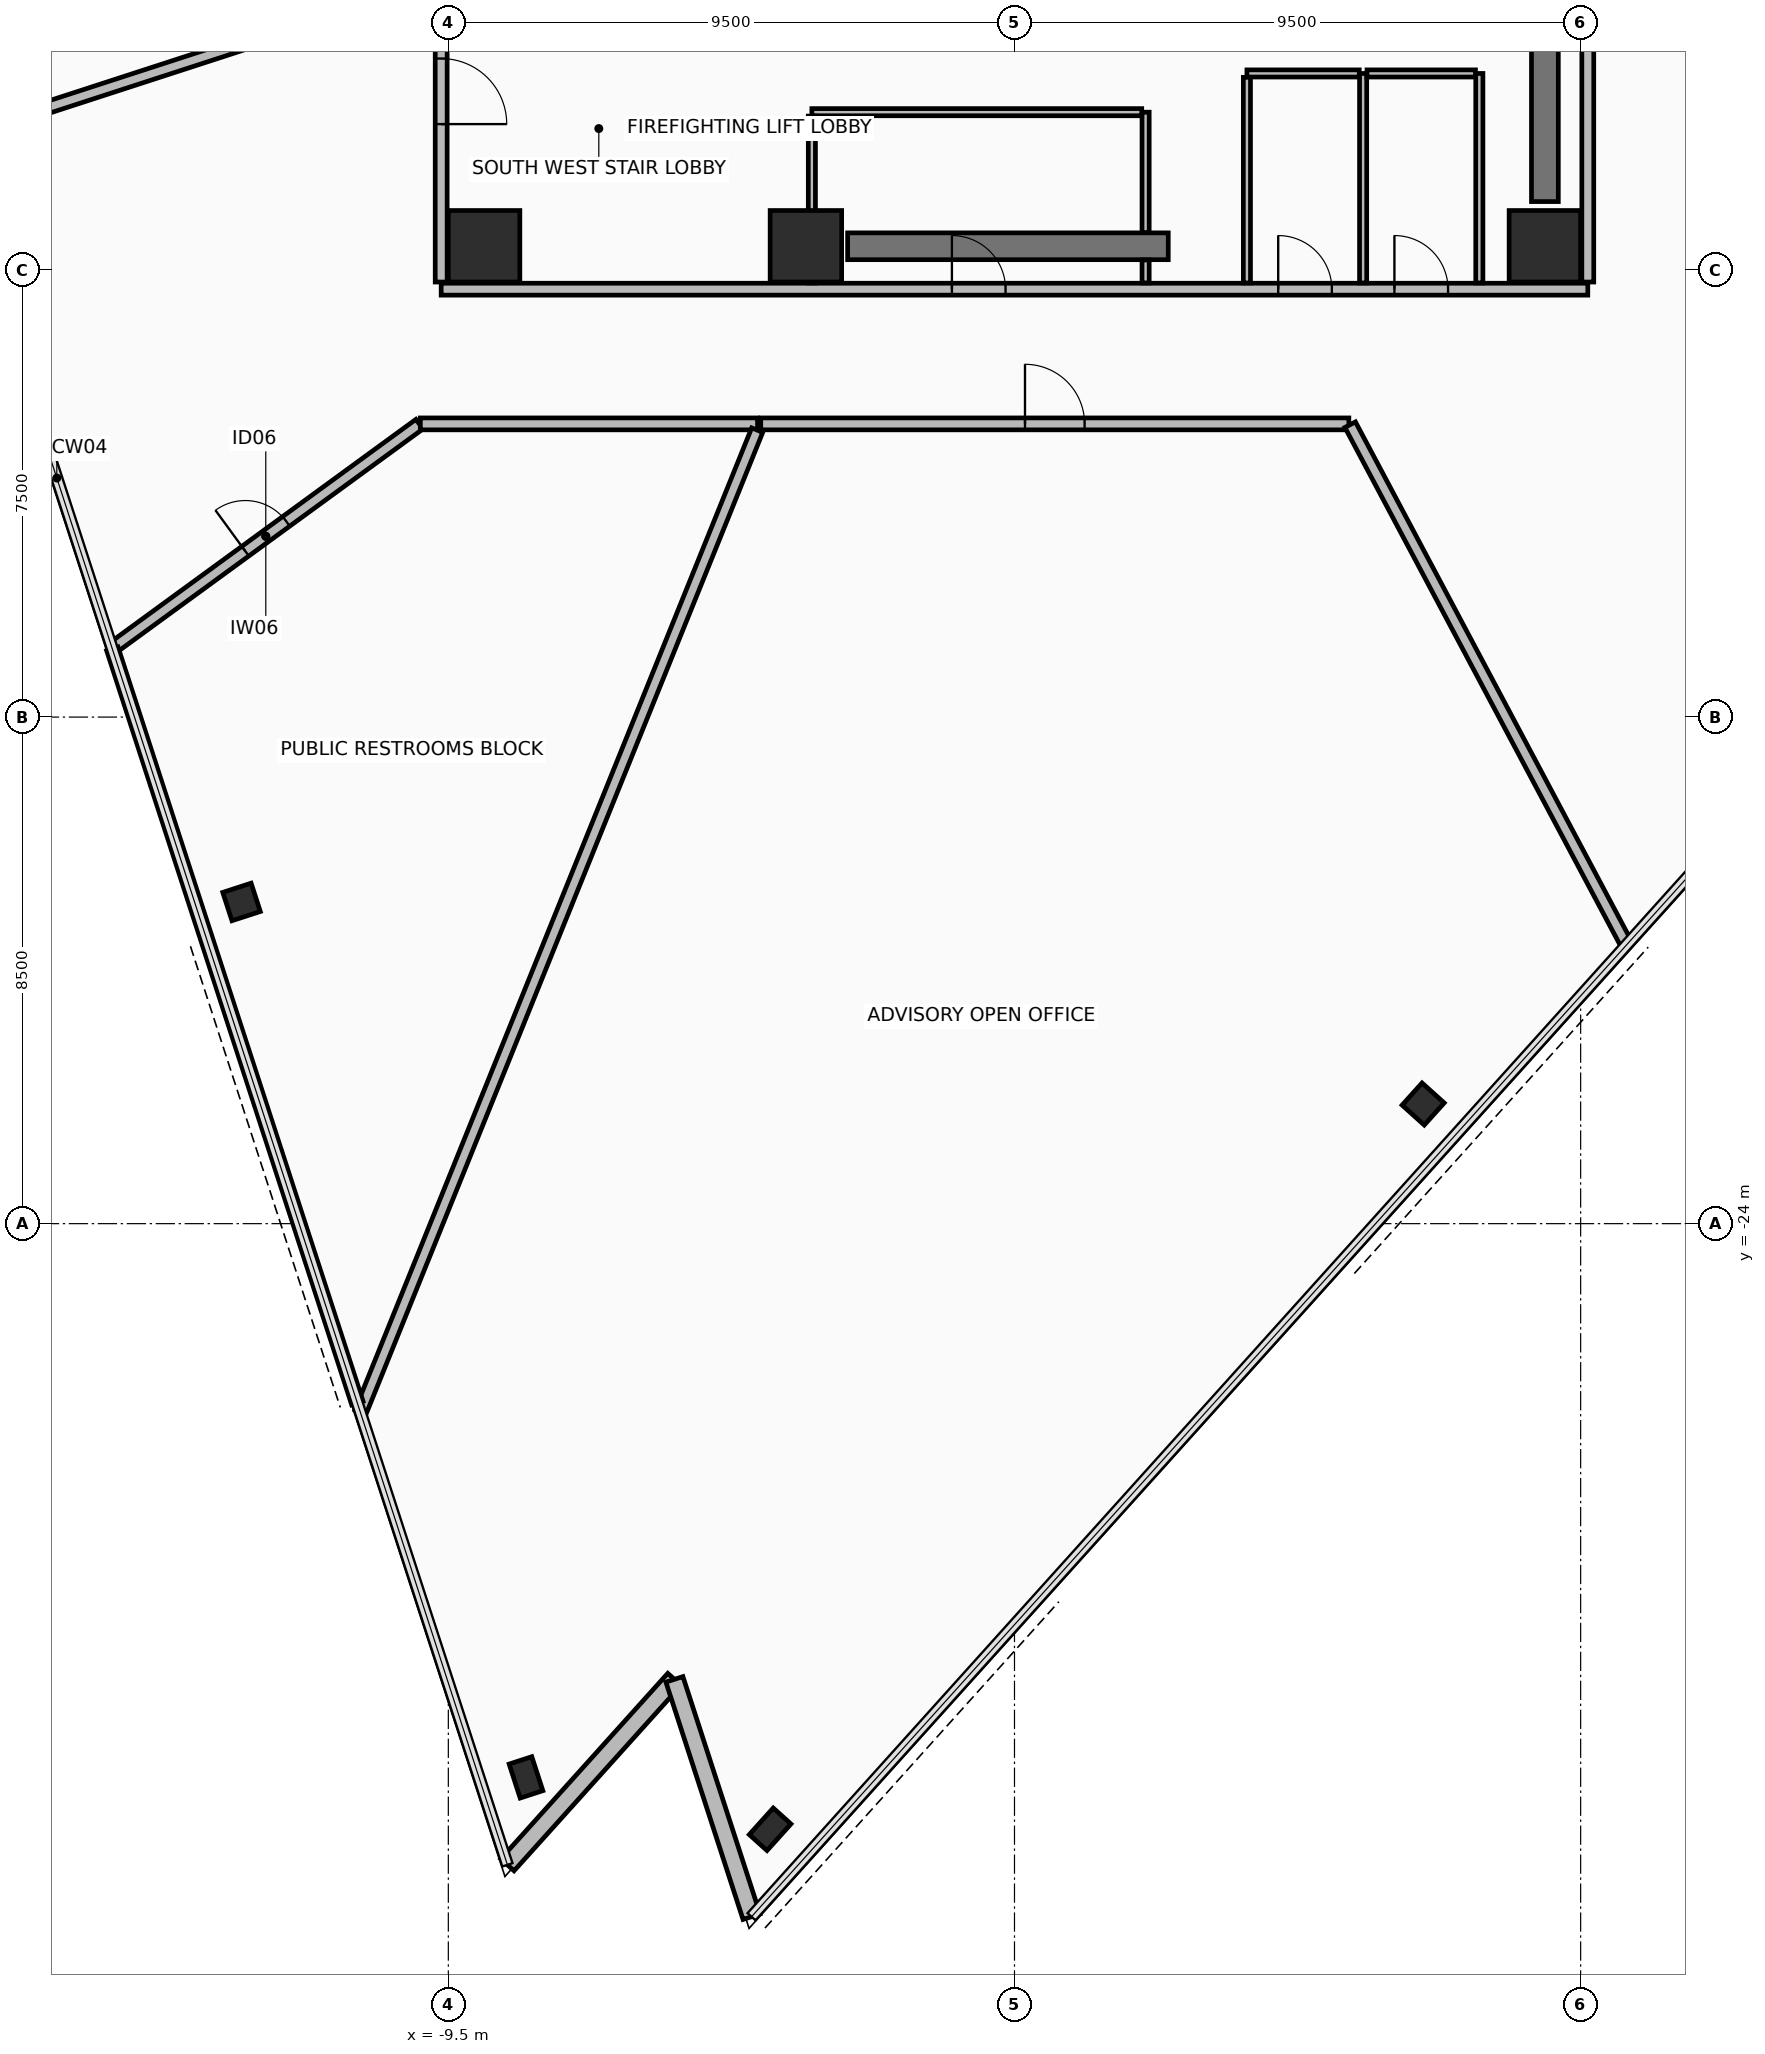
"""IFC4 building model, lengths in metres.
Left out: names, types, materials, properties, quantities, classifications, styles, units other than length and angle.
Written with IfcOpenShell. Run it as: python <this file> out.ifc"""

import sys

from ifc_helpers import new_model, si_unit, direction, frame, frame_2d, origin, origin_2d, place, context, subcontext, project, spatial, rectangle, hollow_rectangle, extrude, element, fill, save


model = new_model("IFC4")
c1 = context("Model", 3, precision=1e-05, world=origin(), true_north=direction((0.0, 1.0)))
c2 = subcontext(c1, "Body", "Model", "MODEL_VIEW")
j1 = project(units=[si_unit("LENGTHUNIT", "METRE"), si_unit("PLANEANGLEUNIT", "RADIAN")], contexts=[c1])
p1 = place(None, origin())
s1 = spatial("IfcSite", under=j1, at=p1, CompositionType="ELEMENT")
p2 = place(p1, origin())
s2 = spatial("IfcBuilding", under=s1, at=p2, CompositionType="ELEMENT")
p3 = place(p2, frame((0.0, 0.0, 207.65)))
s3 = spatial("IfcBuildingStorey", under=s2, at=p3, CompositionType="ELEMENT", Elevation=207.65)
for number, where, z_axis, x_axis in (
    (1, (-8.9, -7.6, 0.0), (0.0, 0.0, 1.0), (1.0, 0.0, 0.0)),
    (2, (-3.5, -7.6, 0.0), (0.0, 0.0, 1.0), (1.0, 0.0, 0.0)),
    (3, (8.9, -7.6, 0.0), (0.0, 0.0, 1.0), (1.0, 0.0, 0.0)),
):
    element("IfcColumn", number, at=place(p3, frame(where, z_axis=z_axis, x_axis=x_axis)), inside=s3, PredefinedType="COLUMN", context=c2, shape_type="SweptSolid", body=[
        extrude(rectangle(XDim=1.2, YDim=1.2, at=origin_2d()), origin(), (0.0, 0.0, 1.0), 3.6),
    ])
p4 = place(p3, frame((-12.97, -18.602, 0.0), z_axis=(0.0, 0.0, 1.0), x_axis=(-0.309016994375, 0.951056516295, 0.0)))
e4 = element("IfcColumn", 4, at=p4, inside=s3, PredefinedType="COLUMN", context=c2, shape_type="SweptSolid", body=[
    extrude(hollow_rectangle(XDim=0.5, YDim=0.5, WallThickness=0.032, at=origin_2d()), origin(), (0.0, 0.0, 1.0), 3.6),
])
for number, where, z_axis, x_axis in (
    (5, (-8.197, -33.292, 0.0), (0.0, 0.0, 1.0), (-0.309, 0.951, 0.0)),
    (6, (-4.1, -34.162, 0.0), (0.0, 0.0, 1.0), (0.669, 0.743, 0.0)),
):
    element("IfcColumn", number, at=place(p3, frame(where, z_axis=z_axis, x_axis=x_axis)), inside=s3, PredefinedType="COLUMN", context=c2, shape_type="SweptSolid", body=[
        extrude(hollow_rectangle(XDim=0.4, YDim=0.6, WallThickness=0.03, at=origin_2d()), origin(), (0.0, 0.0, 1.0), 3.6),
    ])
p5 = place(p3, frame((6.857, -21.992, 0.0), z_axis=(0.0, 0.0, 1.0), x_axis=(0.669130606359, 0.743144825477, 0.0)))
e7 = element("IfcColumn", 7, at=p5, inside=s3, PredefinedType="COLUMN", context=c2, shape_type="SweptSolid", body=[
    extrude(hollow_rectangle(XDim=0.5, YDim=0.5, WallThickness=0.032, at=origin_2d()), origin(), (0.0, 0.0, 1.0), 3.6),
])
p6 = place(p3, frame((-8.509, -34.759, 0.0), z_axis=(0.0, 0.0, 1.0), x_axis=(0.669151507466, 0.743126005504, 0.0)))
e8 = element("IfcWall", 8, at=p6, inside=s3, PredefinedType="STANDARD", context=c2, shape_type="SweptSolid", body=[
    extrude(rectangle(XDim=4.188, YDim=0.3, at=frame_2d((2.094, 0.0))), origin(), (0.0, 0.0, 1.0), 2.715),
])
p7 = place(p3, frame((-5.706, -31.646, 0.0), z_axis=(0.0, 0.0, 1.0), x_axis=(0.309030708092, -0.951052060329, 0.0)))
e9 = element("IfcWall", 9, at=p7, inside=s3, PredefinedType="STANDARD", context=c2, shape_type="SweptSolid", body=[
    extrude(rectangle(XDim=4.188, YDim=0.3, at=frame_2d((2.094, 0.0))), origin(), (0.0, 0.0, 1.0), 2.715),
])
p8 = place(p3, frame((-2.8, -7.6, 0.0), z_axis=(0.0, 0.0, 1.0), x_axis=(1.0, 0.0, 0.0)))
e10 = element("IfcWall", 10, at=p8, inside=s3, PredefinedType="SHEAR", context=c2, shape_type="SweptSolid", body=[
    extrude(rectangle(XDim=5.38, YDim=0.45, at=frame_2d((2.69, 0.0))), origin(), (0.0, 0.0, 1.0), 3.42),
])
p9 = place(p3, frame((8.9, -6.85, 0.0), z_axis=(0.0, 0.0, 1.0), x_axis=(0.0, 1.0, 0.0)))
e11 = element("IfcWall", 11, at=p9, inside=s3, PredefinedType="SHEAR", context=c2, shape_type="SweptSolid", body=[
    extrude(rectangle(XDim=10.7, YDim=0.45, at=frame_2d((5.35, 0.0))), origin(), (0.0, 0.0, 1.0), 3.42),
])
p10 = place(p3, frame((-9.62, -8.32, 0.0), z_axis=(0.0, 0.0, 1.0), x_axis=(1.0, 0.0, 0.0)))
e12 = element("IfcWall", 12, at=p10, inside=s3, PredefinedType="PARTITIONING", context=c2, shape_type="SweptSolid", body=[
    extrude(rectangle(XDim=19.24, YDim=0.2, at=frame_2d((9.62, 0.0))), origin(), (0.0, 0.0, 1.0), 2.865),
])
p11 = place(p10, frame((8.57, 0.0, 0.0)))
e13 = element("IfcOpeningElement", 13, at=p11, cuts=e12, PredefinedType="OPENING", context=c2, shape_type="SweptSolid", body=[
    extrude(rectangle(XDim=0.9, YDim=2.1, at=frame_2d((0.45, 1.05))), frame((0.0, 0.11, 0.0), z_axis=(0.0, -1.0, 0.0), x_axis=(1.0, 0.0, 0.0)), (0.0, 0.0, 1.0), 0.22),
])
p12 = place(p10, frame((14.045, 0.0, 0.0)))
e14 = element("IfcOpeningElement", 14, at=p12, cuts=e12, PredefinedType="OPENING", context=c2, shape_type="SweptSolid", body=[
    extrude(rectangle(XDim=0.9, YDim=2.1, at=frame_2d((0.45, 1.05))), frame((0.0, 0.11, 0.0), z_axis=(0.0, -1.0, 0.0), x_axis=(1.0, 0.0, 0.0)), (0.0, 0.0, 1.0), 0.22),
])
p13 = place(p10, frame((15.995, 0.0, 0.0)))
e15 = element("IfcOpeningElement", 15, at=p13, cuts=e12, PredefinedType="OPENING", context=c2, shape_type="SweptSolid", body=[
    extrude(rectangle(XDim=0.9, YDim=2.1, at=frame_2d((0.45, 1.05))), frame((0.0, 0.11, 0.0), z_axis=(0.0, -1.0, 0.0), x_axis=(1.0, 0.0, 0.0)), (0.0, 0.0, 1.0), 0.22),
])
p14 = place(p3, frame((-9.62, 8.2, 0.0), z_axis=(0.0, 0.0, 1.0), x_axis=(0.0, -1.0, 0.0)))
e16 = element("IfcWall", 16, at=p14, inside=s3, PredefinedType="PARTITIONING", context=c2, shape_type="SweptSolid", body=[
    extrude(rectangle(XDim=16.4, YDim=0.2, at=frame_2d((8.2, 0.0))), origin(), (0.0, 0.0, 1.0), 2.765),
])
p15 = place(p14, frame((12.65, 0.0, 0.0)))
e17 = element("IfcOpeningElement", 17, at=p15, cuts=e16, PredefinedType="OPENING", context=c2, shape_type="SweptSolid", body=[
    extrude(rectangle(XDim=1.1, YDim=2.15, at=frame_2d((0.55, 1.075))), frame((0.0, 0.11, 0.0), z_axis=(0.0, -1.0, 0.0), x_axis=(1.0, 0.0, 0.0)), (0.0, 0.0, 1.0), 0.22),
])
p16 = place(p3, frame((9.62, -8.2, 0.0), z_axis=(0.0, 0.0, 1.0), x_axis=(0.0, 1.0, 0.0)))
e18 = element("IfcWall", 18, at=p16, inside=s3, PredefinedType="PARTITIONING", context=c2, shape_type="SweptSolid", body=[
    extrude(rectangle(XDim=16.4, YDim=0.2, at=frame_2d((8.2, 0.0))), origin(), (0.0, 0.0, 1.0), 2.865),
])
p17 = place(p16, frame((12.65, 0.0, 0.0)))
e19 = element("IfcOpeningElement", 19, at=p17, cuts=e18, PredefinedType="OPENING", context=c2, shape_type="SweptSolid", body=[
    extrude(rectangle(XDim=1.1, YDim=2.15, at=frame_2d((0.55, 1.075))), frame((0.0, 0.11, 0.0), z_axis=(0.0, -1.0, 0.0), x_axis=(1.0, 0.0, 0.0)), (0.0, 0.0, 1.0), 0.22),
])
p18 = place(p3, frame((2.2, -8.215, 0.0), z_axis=(0.0, 0.0, 1.0), x_axis=(0.0, 1.0, 0.0)))
e20 = element("IfcWall", 20, at=p18, inside=s3, PredefinedType="PARTITIONING", context=c2, shape_type="SweptSolid", body=[
    extrude(rectangle(XDim=0.385, YDim=0.12, at=frame_2d((0.192, 0.0))), origin(), (0.0, 0.0, 1.0), 2.715),
])
p19 = place(p3, frame((2.2, -7.37, 0.0), z_axis=(0.0, 0.0, 1.0), x_axis=(0.0, 1.0, 0.0)))
e21 = element("IfcWall", 21, at=p19, inside=s3, PredefinedType="PARTITIONING", context=c2, shape_type="SweptSolid", body=[
    extrude(rectangle(XDim=2.02, YDim=0.12, at=frame_2d((1.01, 0.0))), origin(), (0.0, 0.0, 1.0), 2.715),
])
p20 = place(p3, frame((2.135, -5.35, 0.0), z_axis=(0.0, 0.0, 1.0), x_axis=(-1.0, 0.0, 0.0)))
e22 = element("IfcWall", 22, at=p20, inside=s3, PredefinedType="PARTITIONING", context=c2, shape_type="SweptSolid", body=[
    extrude(rectangle(XDim=5.535, YDim=0.12, at=frame_2d((2.768, 0.0))), origin(), (0.0, 0.0, 1.0), 2.715),
])
p21 = place(p3, frame((-3.4, -5.415, 0.0), z_axis=(0.0, 0.0, 1.0), x_axis=(0.0, -1.0, 0.0)))
e23 = element("IfcWall", 23, at=p21, inside=s3, PredefinedType="PARTITIONING", context=c2, shape_type="SweptSolid", body=[
    extrude(rectangle(XDim=2.8, YDim=0.12, at=frame_2d((1.4, 0.0))), origin(), (0.0, 0.0, 1.0), 2.715),
])
p22 = place(p3, frame((5.85, -8.215, 0.0), z_axis=(0.0, 0.0, 1.0), x_axis=(0.0, 1.0, 0.0)))
e24 = element("IfcWall", 24, at=p22, inside=s3, PredefinedType="PARTITIONING", context=c2, shape_type="SweptSolid", body=[
    extrude(rectangle(XDim=3.515, YDim=0.12, at=frame_2d((1.758, 0.0))), origin(), (0.0, 0.0, 1.0), 2.715),
])
p23 = place(p3, frame((5.785, -4.7, 0.0), z_axis=(0.0, 0.0, 1.0), x_axis=(-1.0, 0.0, 0.0)))
e25 = element("IfcWall", 25, at=p23, inside=s3, PredefinedType="PARTITIONING", context=c2, shape_type="SweptSolid", body=[
    extrude(rectangle(XDim=1.885, YDim=0.12, at=frame_2d((0.942, 0.0))), origin(), (0.0, 0.0, 1.0), 3.42),
])
p24 = place(p3, frame((3.9, -4.765, 0.0), z_axis=(0.0, 0.0, 1.0), x_axis=(0.0, -1.0, 0.0)))
e26 = element("IfcWall", 26, at=p24, inside=s3, PredefinedType="PARTITIONING", context=c2, shape_type="SweptSolid", body=[
    extrude(rectangle(XDim=3.45, YDim=0.12, at=frame_2d((1.725, 0.0))), origin(), (0.0, 0.0, 1.0), 2.715),
])
p25 = place(p3, frame((7.8, -8.215, 0.0), z_axis=(0.0, 0.0, 1.0), x_axis=(0.0, 1.0, 0.0)))
e27 = element("IfcWall", 27, at=p25, inside=s3, PredefinedType="PARTITIONING", context=c2, shape_type="SweptSolid", body=[
    extrude(rectangle(XDim=3.515, YDim=0.12, at=frame_2d((1.758, 0.0))), origin(), (0.0, 0.0, 1.0), 2.715),
])
p26 = place(p3, frame((7.735, -4.7, 0.0), z_axis=(0.0, 0.0, 1.0), x_axis=(-1.0, 0.0, 0.0)))
e28 = element("IfcWall", 28, at=p26, inside=s3, PredefinedType="PARTITIONING", context=c2, shape_type="SweptSolid", body=[
    extrude(rectangle(XDim=1.82, YDim=0.12, at=frame_2d((0.91, 0.0))), origin(), (0.0, 0.0, 1.0), 3.42),
])
p27 = place(p3, frame((-15.141, -14.347, 0.0), z_axis=(0.0, 0.0, 1.0), x_axis=(0.807843616105, 0.589396888284, 0.0)))
e29 = element("IfcWall", 29, at=p27, inside=s3, PredefinedType="PARTITIONING", context=c2, shape_type="SweptSolid", body=[
    extrude(rectangle(XDim=6.383, YDim=0.2, at=frame_2d((3.191, 0.0))), origin(), (0.0, 0.0, 1.0), 2.715),
])
p28 = place(p27, frame((2.766, 0.0, 0.0)))
e30 = element("IfcOpeningElement", 30, at=p28, cuts=e29, PredefinedType="OPENING", context=c2, shape_type="SweptSolid", body=[
    extrude(rectangle(XDim=0.85, YDim=2.1, at=frame_2d((0.425, 1.05))), frame((0.0, 0.11, 0.0), z_axis=(0.0, -1.0, 0.0), x_axis=(1.0, 0.0, 0.0)), (0.0, 0.0, 1.0), 0.22),
])
p29 = place(p3, frame((-9.97, -10.58, 0.0), z_axis=(0.0, 0.0, 1.0), x_axis=(1.0, 0.0, 0.0)))
e31 = element("IfcWall", 31, at=p29, inside=s3, PredefinedType="PARTITIONING", context=c2, shape_type="SweptSolid", body=[
    extrude(rectangle(XDim=5.658, YDim=0.2, at=frame_2d((2.829, 0.0))), origin(), (0.0, 0.0, 1.0), 2.865),
])
p30 = place(p3, frame((-4.317, -10.685, 0.0), z_axis=(0.0, 0.0, 1.0), x_axis=(-0.374604298034, -0.927184781958, 0.0)))
e32 = element("IfcWall", 32, at=p30, inside=s3, PredefinedType="PARTITIONING", context=c2, shape_type="SweptSolid", body=[
    extrude(rectangle(XDim=17.775, YDim=0.2, at=frame_2d((8.888, 0.0))), origin(), (0.0, 0.0, 1.0), 2.715),
])
p31 = place(p3, frame((-11.026, -27.011, 0.0), z_axis=(0.0, 0.0, 1.0), x_axis=(-0.309025926892, 0.951053613898, 0.0)))
e33 = element("IfcWall", 33, at=p31, inside=s3, PredefinedType="PARTITIONING", context=c2, shape_type="SweptSolid", body=[
    extrude(rectangle(XDim=13.309, YDim=0.2, at=frame_2d((6.654, 0.0))), origin(), (0.0, 0.0, 1.0), 3.42),
])
p32 = place(p3, frame((-11.897, -3.866, 0.0), z_axis=(0.0, 0.0, 1.0), x_axis=(-0.951062833603, -0.308997551024, 0.0)))
e34 = element("IfcWall", 34, at=p32, inside=s3, PredefinedType="PARTITIONING", context=c2, shape_type="SweptSolid", body=[
    extrude(rectangle(XDim=6.299, YDim=0.2, at=frame_2d((3.149, 0.0))), origin(), (0.0, 0.0, 1.0), 2.715),
])
p33 = place(p3, frame((-4.258, -10.58, 0.0), z_axis=(0.0, 0.0, 1.0), x_axis=(1.0, 0.0, 0.0)))
e35 = element("IfcWall", 35, at=p33, inside=s3, PredefinedType="PARTITIONING", context=c2, shape_type="SweptSolid", body=[
    extrude(rectangle(XDim=9.868, YDim=0.2, at=frame_2d((4.934, 0.0))), origin(), (0.0, 0.0, 1.0), 2.865),
])
p34 = place(p33, frame((4.434, 0.0, 0.0)))
e36 = element("IfcOpeningElement", 36, at=p34, cuts=e35, PredefinedType="OPENING", context=c2, shape_type="SweptSolid", body=[
    extrude(rectangle(XDim=1.0, YDim=2.15, at=frame_2d((0.5, 1.075))), frame((0.0, 0.11, 0.0), z_axis=(0.0, -1.0, 0.0), x_axis=(1.0, 0.0, 0.0)), (0.0, 0.0, 1.0), 0.22),
])
p35 = place(p3, frame((5.633, -10.593, 0.0), z_axis=(0.0, 0.0, 1.0), x_axis=(0.46946276715, -0.882952269525, 0.0)))
e37 = element("IfcWall", 37, at=p35, inside=s3, PredefinedType="PARTITIONING", context=c2, shape_type="SweptSolid", body=[
    extrude(rectangle(XDim=9.866, YDim=0.2, at=frame_2d((4.933, 0.0))), origin(), (0.0, 0.0, 1.0), 2.715),
])
p36 = place(p15, frame((1.1, 0.0, 0.0), z_axis=(0.0, 0.0, 1.0), x_axis=(-1.0, 0.0, 0.0)))
e38 = element("IfcDoor", 38, at=p36, inside=s3, OperationType="SINGLE_SWING_LEFT", PredefinedType="DOOR", context=c2, shape_type="SweptSolid", body=[
    extrude(rectangle(XDim=1.1, YDim=2.15, at=frame_2d((0.55, 1.075))), frame((0.0, 0.025, 0.0), z_axis=(0.0, -1.0, 0.0), x_axis=(1.0, 0.0, 0.0)), (0.0, 0.0, 1.0), 0.05),
])
fill(e17, e38)
p37 = place(p11, origin())
e39 = element("IfcDoor", 39, at=p37, inside=s3, OperationType="SINGLE_SWING_LEFT", PredefinedType="DOOR", context=c2, shape_type="SweptSolid", body=[
    extrude(rectangle(XDim=0.9, YDim=2.1, at=frame_2d((0.45, 1.05))), frame((0.0, 0.025, 0.0), z_axis=(0.0, -1.0, 0.0), x_axis=(1.0, 0.0, 0.0)), (0.0, 0.0, 1.0), 0.05),
])
fill(e13, e39)
p38 = place(p12, origin())
e40 = element("IfcDoor", 40, at=p38, inside=s3, OperationType="SINGLE_SWING_LEFT", PredefinedType="DOOR", context=c2, shape_type="SweptSolid", body=[
    extrude(rectangle(XDim=0.9, YDim=2.1, at=frame_2d((0.45, 1.05))), frame((0.0, 0.025, 0.0), z_axis=(0.0, -1.0, 0.0), x_axis=(1.0, 0.0, 0.0)), (0.0, 0.0, 1.0), 0.05),
])
fill(e14, e40)
p39 = place(p13, origin())
e41 = element("IfcDoor", 41, at=p39, inside=s3, OperationType="SINGLE_SWING_LEFT", PredefinedType="DOOR", context=c2, shape_type="SweptSolid", body=[
    extrude(rectangle(XDim=0.9, YDim=2.1, at=frame_2d((0.45, 1.05))), frame((0.0, 0.025, 0.0), z_axis=(0.0, -1.0, 0.0), x_axis=(1.0, 0.0, 0.0)), (0.0, 0.0, 1.0), 0.05),
])
fill(e15, e41)
p40 = place(p28, origin())
e42 = element("IfcDoor", 42, at=p40, inside=s3, OperationType="SINGLE_SWING_RIGHT", PredefinedType="DOOR", context=c2, shape_type="SweptSolid", body=[
    extrude(rectangle(XDim=0.85, YDim=2.1, at=frame_2d((0.425, 1.05))), frame((0.0, 0.025, 0.0), z_axis=(0.0, -1.0, 0.0), x_axis=(1.0, 0.0, 0.0)), (0.0, 0.0, 1.0), 0.05),
])
fill(e30, e42)
p41 = place(p34, origin())
e43 = element("IfcDoor", 43, at=p41, inside=s3, OperationType="SINGLE_SWING_RIGHT", PredefinedType="DOOR", context=c2, shape_type="SweptSolid", body=[
    extrude(rectangle(XDim=1.0, YDim=2.15, at=frame_2d((0.5, 1.075))), frame((0.0, 0.025, 0.0), z_axis=(0.0, -1.0, 0.0), x_axis=(1.0, 0.0, 0.0)), (0.0, 0.0, 1.0), 0.05),
])
fill(e36, e43)
save(model, sys.argv[1])
